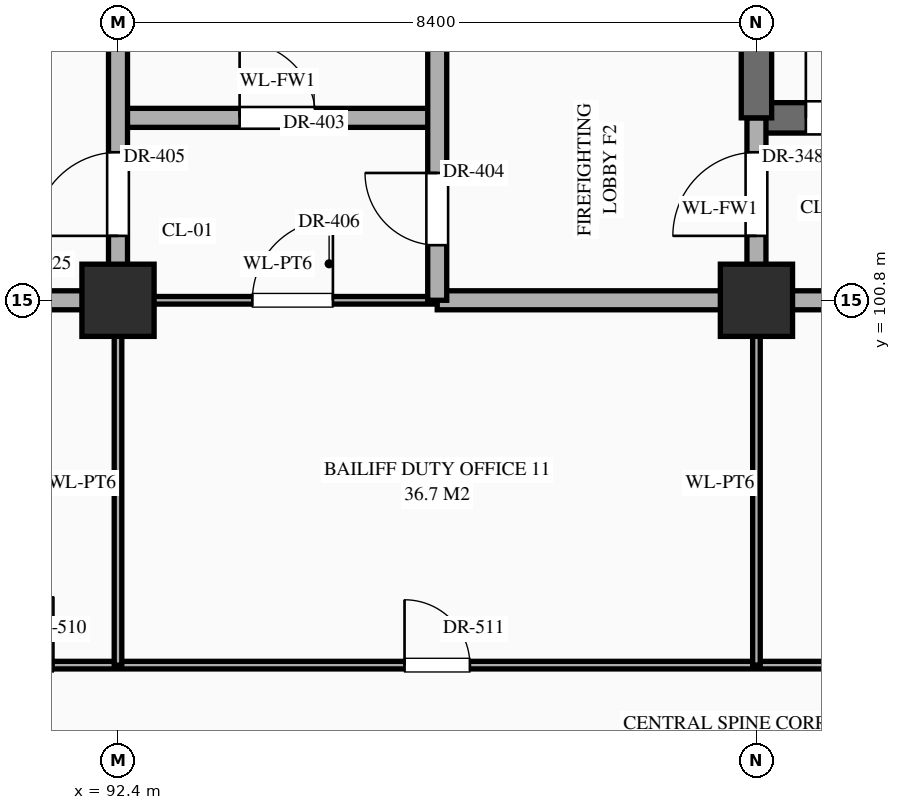
"""IFC4 building model, lengths in metres.
Left out: names, types, materials, properties, quantities, classifications, styles, units other than length and angle.
Written with IfcOpenShell. Run it as: python <this file> out.ifc"""

import sys

from ifc_helpers import new_model, si_unit, direction, frame, frame_2d, origin, origin_2d, place, context, subcontext, project, spatial, rectangle, extrude, element, fill, save


model = new_model("IFC4")
c1 = context("Model", 3, precision=1e-05, world=origin(), true_north=direction((0.0, 1.0)))
c2 = subcontext(c1, "Body", "Model", "MODEL_VIEW")
j1 = project(units=[si_unit("LENGTHUNIT", "METRE"), si_unit("PLANEANGLEUNIT", "RADIAN")], contexts=[c1])
p1 = place(None, origin())
s1 = spatial("IfcSite", under=j1, at=p1, CompositionType="ELEMENT")
p2 = place(p1, origin())
s2 = spatial("IfcBuilding", under=s1, at=p2, CompositionType="ELEMENT")
p3 = place(p2, frame((0.0, 0.0, -5.4)))
s3 = spatial("IfcBuildingStorey", under=s2, at=p3, CompositionType="ELEMENT", Elevation=-5.4)
for number, where, z_axis, x_axis in (
    (1, (92.4, 100.8, 0.0), (0.0, 0.0, 1.0), (1.0, 0.0, 0.0)),
    (2, (100.8, 100.8, 0.0), (0.0, 0.0, 1.0), (1.0, 0.0, 0.0)),
):
    element("IfcColumn", number, at=place(p3, frame(where, z_axis=z_axis, x_axis=x_axis)), inside=s3, PredefinedType="COLUMN", context=c2, shape_type="SweptSolid", body=[
        extrude(rectangle(XDim=0.95, YDim=0.95, at=origin_2d()), origin(), (0.0, 0.0, 1.0), 5.4),
    ])
p4 = place(p3, frame((16.8, 96.0, 0.0), z_axis=(0.0, 0.0, 1.0), x_axis=(1.0, 0.0, 0.0)))
e3 = element("IfcWall", 3, at=p4, inside=s3, PredefinedType="STANDARD", context=c2, shape_type="SweptSolid", body=[
    extrude(rectangle(XDim=134.4, YDim=0.1, at=frame_2d((67.2, 0.0))), origin(), (0.0, 0.0, 1.0), 5.1),
])
p5 = place(p4, frame((3.56, 0.0, 0.0)))
e4 = element("IfcOpeningElement", 4, at=p5, cuts=e3, PredefinedType="OPENING", context=c2, shape_type="SweptSolid", body=[
    extrude(rectangle(XDim=1.28, YDim=2.35, at=frame_2d((0.64, 1.175))), frame((0.0, 0.062, 0.0), z_axis=(0.0, -1.0, 0.0), x_axis=(1.0, 0.0, 0.0)), (0.0, 0.0, 1.0), 0.124),
])
p6 = place(p4, frame((9.63, 0.0, 0.0)))
e5 = element("IfcOpeningElement", 5, at=p6, cuts=e3, PredefinedType="OPENING", context=c2, shape_type="SweptSolid", body=[
    extrude(rectangle(XDim=0.94, YDim=2.3, at=frame_2d((0.47, 1.15))), frame((0.0, 0.062, 0.0), z_axis=(0.0, -1.0, 0.0), x_axis=(1.0, 0.0, 0.0)), (0.0, 0.0, 1.0), 0.124),
])
p7 = place(p4, frame((12.51, 0.0, 0.0)))
e6 = element("IfcOpeningElement", 6, at=p7, cuts=e3, PredefinedType="OPENING", context=c2, shape_type="SweptSolid", body=[
    extrude(rectangle(XDim=0.98, YDim=2.35, at=frame_2d((0.49, 1.175))), frame((0.0, 0.062, 0.0), z_axis=(0.0, -1.0, 0.0), x_axis=(1.0, 0.0, 0.0)), (0.0, 0.0, 1.0), 0.124),
])
p8 = place(p4, frame((14.99, 0.0, 0.0)))
e7 = element("IfcOpeningElement", 7, at=p8, cuts=e3, PredefinedType="OPENING", context=c2, shape_type="SweptSolid", body=[
    extrude(rectangle(XDim=1.02, YDim=2.4, at=frame_2d((0.51, 1.2))), frame((0.0, 0.062, 0.0), z_axis=(0.0, -1.0, 0.0), x_axis=(1.0, 0.0, 0.0)), (0.0, 0.0, 1.0), 0.124),
])
p9 = place(p4, frame((20.47, 0.0, 0.0)))
e8 = element("IfcOpeningElement", 8, at=p9, cuts=e3, PredefinedType="OPENING", context=c2, shape_type="SweptSolid", body=[
    extrude(rectangle(XDim=1.06, YDim=2.4, at=frame_2d((0.53, 1.2))), frame((0.0, 0.062, 0.0), z_axis=(0.0, -1.0, 0.0), x_axis=(1.0, 0.0, 0.0)), (0.0, 0.0, 1.0), 0.124),
])
p10 = place(p4, frame((28.83, 0.0, 0.0)))
e9 = element("IfcOpeningElement", 9, at=p10, cuts=e3, PredefinedType="OPENING", context=c2, shape_type="SweptSolid", body=[
    extrude(rectangle(XDim=1.14, YDim=2.4, at=frame_2d((0.57, 1.2))), frame((0.0, 0.062, 0.0), z_axis=(0.0, -1.0, 0.0), x_axis=(1.0, 0.0, 0.0)), (0.0, 0.0, 1.0), 0.124),
])
p11 = place(p4, frame((34.78, 0.0, 0.0)))
e10 = element("IfcOpeningElement", 10, at=p11, cuts=e3, PredefinedType="OPENING", context=c2, shape_type="SweptSolid", body=[
    extrude(rectangle(XDim=1.04, YDim=2.2, at=frame_2d((0.52, 1.1))), frame((0.0, 0.062, 0.0), z_axis=(0.0, -1.0, 0.0), x_axis=(1.0, 0.0, 0.0)), (0.0, 0.0, 1.0), 0.124),
])
p12 = place(p4, frame((37.66, 0.0, 0.0)))
e11 = element("IfcOpeningElement", 11, at=p12, cuts=e3, PredefinedType="OPENING", context=c2, shape_type="SweptSolid", body=[
    extrude(rectangle(XDim=1.08, YDim=2.25, at=frame_2d((0.54, 1.125))), frame((0.0, 0.062, 0.0), z_axis=(0.0, -1.0, 0.0), x_axis=(1.0, 0.0, 0.0)), (0.0, 0.0, 1.0), 0.124),
])
p13 = place(p4, frame((40.14, 0.0, 0.0)))
e12 = element("IfcOpeningElement", 12, at=p13, cuts=e3, PredefinedType="OPENING", context=c2, shape_type="SweptSolid", body=[
    extrude(rectangle(XDim=1.12, YDim=2.25, at=frame_2d((0.56, 1.125))), frame((0.0, 0.062, 0.0), z_axis=(0.0, -1.0, 0.0), x_axis=(1.0, 0.0, 0.0)), (0.0, 0.0, 1.0), 0.124),
])
p14 = place(p4, frame((45.62, 0.0, 0.0)))
e13 = element("IfcOpeningElement", 13, at=p14, cuts=e3, PredefinedType="OPENING", context=c2, shape_type="SweptSolid", body=[
    extrude(rectangle(XDim=1.16, YDim=2.3, at=frame_2d((0.58, 1.15))), frame((0.0, 0.062, 0.0), z_axis=(0.0, -1.0, 0.0), x_axis=(1.0, 0.0, 0.0)), (0.0, 0.0, 1.0), 0.124),
])
p15 = place(p4, frame((54.0, 0.0, 0.0)))
e14 = element("IfcOpeningElement", 14, at=p15, cuts=e3, PredefinedType="OPENING", context=c2, shape_type="SweptSolid", body=[
    extrude(rectangle(XDim=1.2, YDim=2.35, at=frame_2d((0.6, 1.175))), frame((0.0, 0.062, 0.0), z_axis=(0.0, -1.0, 0.0), x_axis=(1.0, 0.0, 0.0)), (0.0, 0.0, 1.0), 0.124),
])
p16 = place(p4, frame((62.38, 0.0, 0.0)))
e15 = element("IfcOpeningElement", 15, at=p16, cuts=e3, PredefinedType="OPENING", context=c2, shape_type="SweptSolid", body=[
    extrude(rectangle(XDim=1.24, YDim=2.3, at=frame_2d((0.62, 1.15))), frame((0.0, 0.062, 0.0), z_axis=(0.0, -1.0, 0.0), x_axis=(1.0, 0.0, 0.0)), (0.0, 0.0, 1.0), 0.124),
])
p17 = place(p4, frame((68.37, 0.0, 0.0)))
e16 = element("IfcOpeningElement", 16, at=p17, cuts=e3, PredefinedType="OPENING", context=c2, shape_type="SweptSolid", body=[
    extrude(rectangle(XDim=1.06, YDim=2.4, at=frame_2d((0.53, 1.2))), frame((0.0, 0.062, 0.0), z_axis=(0.0, -1.0, 0.0), x_axis=(1.0, 0.0, 0.0)), (0.0, 0.0, 1.0), 0.124),
])
p18 = place(p4, frame((71.23, 0.0, 0.0)))
e17 = element("IfcOpeningElement", 17, at=p18, cuts=e3, PredefinedType="OPENING", context=c2, shape_type="SweptSolid", body=[
    extrude(rectangle(XDim=1.14, YDim=2.4, at=frame_2d((0.57, 1.2))), frame((0.0, 0.062, 0.0), z_axis=(0.0, -1.0, 0.0), x_axis=(1.0, 0.0, 0.0)), (0.0, 0.0, 1.0), 0.124),
])
p19 = place(p4, frame((73.85, 0.0, 0.0)))
e18 = element("IfcOpeningElement", 18, at=p19, cuts=e3, PredefinedType="OPENING", context=c2, shape_type="SweptSolid", body=[
    extrude(rectangle(XDim=0.9, YDim=2.15, at=frame_2d((0.45, 1.075))), frame((0.0, 0.062, 0.0), z_axis=(0.0, -1.0, 0.0), x_axis=(1.0, 0.0, 0.0)), (0.0, 0.0, 1.0), 0.124),
])
p20 = place(p4, frame((79.37, 0.0, 0.0)))
e19 = element("IfcOpeningElement", 19, at=p20, cuts=e3, PredefinedType="OPENING", context=c2, shape_type="SweptSolid", body=[
    extrude(rectangle(XDim=0.86, YDim=2.1, at=frame_2d((0.43, 1.05))), frame((0.0, 0.062, 0.0), z_axis=(0.0, -1.0, 0.0), x_axis=(1.0, 0.0, 0.0)), (0.0, 0.0, 1.0), 0.124),
])
p21 = place(p4, frame((87.74, 0.0, 0.0)))
e20 = element("IfcOpeningElement", 20, at=p21, cuts=e3, PredefinedType="OPENING", context=c2, shape_type="SweptSolid", body=[
    extrude(rectangle(XDim=0.92, YDim=2.15, at=frame_2d((0.46, 1.075))), frame((0.0, 0.062, 0.0), z_axis=(0.0, -1.0, 0.0), x_axis=(1.0, 0.0, 0.0)), (0.0, 0.0, 1.0), 0.124),
])
p22 = place(p4, frame((93.62, 0.0, 0.0)))
e21 = element("IfcOpeningElement", 21, at=p22, cuts=e3, PredefinedType="OPENING", context=c2, shape_type="SweptSolid", body=[
    extrude(rectangle(XDim=0.96, YDim=2.2, at=frame_2d((0.48, 1.1))), frame((0.0, 0.062, 0.0), z_axis=(0.0, -1.0, 0.0), x_axis=(1.0, 0.0, 0.0)), (0.0, 0.0, 1.0), 0.124),
])
p23 = place(p4, frame((96.5, 0.0, 0.0)))
e22 = element("IfcOpeningElement", 22, at=p23, cuts=e3, PredefinedType="OPENING", context=c2, shape_type="SweptSolid", body=[
    extrude(rectangle(XDim=1.0, YDim=2.25, at=frame_2d((0.5, 1.125))), frame((0.0, 0.062, 0.0), z_axis=(0.0, -1.0, 0.0), x_axis=(1.0, 0.0, 0.0)), (0.0, 0.0, 1.0), 0.124),
])
p24 = place(p4, frame((98.98, 0.0, 0.0)))
e23 = element("IfcOpeningElement", 23, at=p24, cuts=e3, PredefinedType="OPENING", context=c2, shape_type="SweptSolid", body=[
    extrude(rectangle(XDim=1.04, YDim=2.2, at=frame_2d((0.52, 1.1))), frame((0.0, 0.062, 0.0), z_axis=(0.0, -1.0, 0.0), x_axis=(1.0, 0.0, 0.0)), (0.0, 0.0, 1.0), 0.124),
])
p25 = place(p4, frame((104.53, 0.0, 0.0)))
e24 = element("IfcOpeningElement", 24, at=p25, cuts=e3, PredefinedType="OPENING", context=c2, shape_type="SweptSolid", body=[
    extrude(rectangle(XDim=0.94, YDim=2.3, at=frame_2d((0.47, 1.15))), frame((0.0, 0.062, 0.0), z_axis=(0.0, -1.0, 0.0), x_axis=(1.0, 0.0, 0.0)), (0.0, 0.0, 1.0), 0.124),
])
p26 = place(p4, frame((112.91, 0.0, 0.0)))
e25 = element("IfcOpeningElement", 25, at=p26, cuts=e3, PredefinedType="OPENING", context=c2, shape_type="SweptSolid", body=[
    extrude(rectangle(XDim=0.98, YDim=2.35, at=frame_2d((0.49, 1.175))), frame((0.0, 0.062, 0.0), z_axis=(0.0, -1.0, 0.0), x_axis=(1.0, 0.0, 0.0)), (0.0, 0.0, 1.0), 0.124),
])
p27 = place(p4, frame((118.79, 0.0, 0.0)))
e26 = element("IfcOpeningElement", 26, at=p27, cuts=e3, PredefinedType="OPENING", context=c2, shape_type="SweptSolid", body=[
    extrude(rectangle(XDim=1.02, YDim=2.4, at=frame_2d((0.51, 1.2))), frame((0.0, 0.062, 0.0), z_axis=(0.0, -1.0, 0.0), x_axis=(1.0, 0.0, 0.0)), (0.0, 0.0, 1.0), 0.124),
])
p28 = place(p4, frame((121.67, 0.0, 0.0)))
e27 = element("IfcOpeningElement", 27, at=p28, cuts=e3, PredefinedType="OPENING", context=c2, shape_type="SweptSolid", body=[
    extrude(rectangle(XDim=1.06, YDim=2.4, at=frame_2d((0.53, 1.2))), frame((0.0, 0.062, 0.0), z_axis=(0.0, -1.0, 0.0), x_axis=(1.0, 0.0, 0.0)), (0.0, 0.0, 1.0), 0.124),
])
p29 = place(p4, frame((124.13, 0.0, 0.0)))
e28 = element("IfcOpeningElement", 28, at=p29, cuts=e3, PredefinedType="OPENING", context=c2, shape_type="SweptSolid", body=[
    extrude(rectangle(XDim=1.14, YDim=2.4, at=frame_2d((0.57, 1.2))), frame((0.0, 0.062, 0.0), z_axis=(0.0, -1.0, 0.0), x_axis=(1.0, 0.0, 0.0)), (0.0, 0.0, 1.0), 0.124),
])
p30 = place(p4, frame((129.75, 0.0, 0.0)))
e29 = element("IfcOpeningElement", 29, at=p30, cuts=e3, PredefinedType="OPENING", context=c2, shape_type="SweptSolid", body=[
    extrude(rectangle(XDim=0.9, YDim=2.15, at=frame_2d((0.45, 1.075))), frame((0.0, 0.062, 0.0), z_axis=(0.0, -1.0, 0.0), x_axis=(1.0, 0.0, 0.0)), (0.0, 0.0, 1.0), 0.124),
])
p31 = place(p3, frame((75.6, 100.8, 0.0), z_axis=(0.0, 0.0, 1.0), x_axis=(1.0, 0.0, 0.0)))
e30 = element("IfcWall", 30, at=p31, inside=s3, PredefinedType="STANDARD", context=c2, shape_type="SweptSolid", body=[
    extrude(rectangle(XDim=16.8, YDim=0.25, at=frame_2d((8.4, 0.0))), origin(), (0.0, 0.0, 1.0), 4.25),
])
p32 = place(p31, frame((3.7, 0.0, 0.0)))
e31 = element("IfcOpeningElement", 31, at=p32, cuts=e30, PredefinedType="OPENING", context=c2, shape_type="SweptSolid", body=[
    extrude(rectangle(XDim=1.0, YDim=2.2, at=frame_2d((0.5, 1.1))), frame((0.0, 0.137, 0.0), z_axis=(0.0, -1.0, 0.0), x_axis=(1.0, 0.0, 0.0)), (0.0, 0.0, 1.0), 0.274),
])
p33 = place(p31, frame((9.748, 0.0, 0.0)))
e32 = element("IfcOpeningElement", 32, at=p33, cuts=e30, PredefinedType="OPENING", context=c2, shape_type="SweptSolid", body=[
    extrude(rectangle(XDim=1.1, YDim=2.2, at=frame_2d((0.55, 1.1))), frame((0.0, 0.137, 0.0), z_axis=(0.0, -1.0, 0.0), x_axis=(1.0, 0.0, 0.0)), (0.0, 0.0, 1.0), 0.274),
])
p34 = place(p31, frame((12.5, 0.0, 0.0)))
e33 = element("IfcOpeningElement", 33, at=p34, cuts=e30, PredefinedType="OPENING", context=c2, shape_type="SweptSolid", body=[
    extrude(rectangle(XDim=1.0, YDim=2.2, at=frame_2d((0.5, 1.1))), frame((0.0, 0.137, 0.0), z_axis=(0.0, -1.0, 0.0), x_axis=(1.0, 0.0, 0.0)), (0.0, 0.0, 1.0), 0.274),
])
p35 = place(p31, frame((14.827, 0.0, 0.0)))
e34 = element("IfcOpeningElement", 34, at=p35, cuts=e30, PredefinedType="OPENING", context=c2, shape_type="SweptSolid", body=[
    extrude(rectangle(XDim=0.95, YDim=2.15, at=frame_2d((0.475, 1.075))), frame((0.0, 0.137, 0.0), z_axis=(0.0, -1.0, 0.0), x_axis=(1.0, 0.0, 0.0)), (0.0, 0.0, 1.0), 0.274),
])
p36 = place(p3, frame((92.4, 100.8, 0.0), z_axis=(0.0, 0.0, 1.0), x_axis=(1.0, 0.0, 0.0)))
e35 = element("IfcWall", 35, at=p36, inside=s3, PredefinedType="STANDARD", context=c2, shape_type="SweptSolid", body=[
    extrude(rectangle(XDim=4.2, YDim=0.1, at=frame_2d((2.1, 0.0))), origin(), (0.0, 0.0, 1.0), 4.25),
])
p37 = place(p36, frame((1.768, 0.0, 0.0)))
e36 = element("IfcOpeningElement", 36, at=p37, cuts=e35, PredefinedType="OPENING", context=c2, shape_type="SweptSolid", body=[
    extrude(rectangle(XDim=1.06, YDim=2.4, at=frame_2d((0.53, 1.2))), frame((0.0, 0.062, 0.0), z_axis=(0.0, -1.0, 0.0), x_axis=(1.0, 0.0, 0.0)), (0.0, 0.0, 1.0), 0.124),
])
p38 = place(p3, frame((96.6, 100.8, 0.0), z_axis=(0.0, 0.0, 1.0), x_axis=(1.0, 0.0, 0.0)))
e37 = element("IfcWall", 37, at=p38, inside=s3, PredefinedType="STANDARD", context=c2, shape_type="SweptSolid", body=[
    extrude(rectangle(XDim=12.6, YDim=0.25, at=frame_2d((6.3, 0.0))), origin(), (0.0, 0.0, 1.0), 4.25),
])
p39 = place(p38, frame((7.925, 0.0, 0.0)))
e38 = element("IfcOpeningElement", 38, at=p39, cuts=e37, PredefinedType="OPENING", context=c2, shape_type="SweptSolid", body=[
    extrude(rectangle(XDim=0.95, YDim=2.15, at=frame_2d((0.475, 1.075))), frame((0.0, 0.137, 0.0), z_axis=(0.0, -1.0, 0.0), x_axis=(1.0, 0.0, 0.0)), (0.0, 0.0, 1.0), 0.274),
])
p40 = place(p3, frame((92.4, 103.2, 0.0), z_axis=(0.0, 0.0, 1.0), x_axis=(1.0, 0.0, 0.0)))
e39 = element("IfcWall", 39, at=p40, inside=s3, PredefinedType="STANDARD", context=c2, shape_type="SweptSolid", body=[
    extrude(rectangle(XDim=4.2, YDim=0.25, at=frame_2d((2.1, 0.0))), origin(), (0.0, 0.0, 1.0), 5.1),
])
p41 = place(p40, frame((1.6, 0.0, 0.0)))
e40 = element("IfcOpeningElement", 40, at=p41, cuts=e39, PredefinedType="OPENING", context=c2, shape_type="SweptSolid", body=[
    extrude(rectangle(XDim=1.0, YDim=2.2, at=frame_2d((0.5, 1.1))), frame((0.0, 0.137, 0.0), z_axis=(0.0, -1.0, 0.0), x_axis=(1.0, 0.0, 0.0)), (0.0, 0.0, 1.0), 0.274),
])
p42 = place(p3, frame((100.8, 103.2, 0.0), z_axis=(0.0, 0.0, 1.0), x_axis=(1.0, 0.0, 0.0)))
e41 = element("IfcWall", 41, at=p42, inside=s3, PredefinedType="SHEAR", context=c2, shape_type="SweptSolid", body=[
    extrude(rectangle(XDim=8.4, YDim=0.4, at=frame_2d((4.2, 0.0))), origin(), (0.0, 0.0, 1.0), 5.1),
])
p43 = place(p42, frame((0.65, 0.0, 0.0)))
e42 = element("IfcOpeningElement", 42, at=p43, cuts=e41, PredefinedType="OPENING", context=c2, shape_type="SweptSolid", body=[
    extrude(rectangle(XDim=1.1, YDim=2.2, at=frame_2d((0.55, 1.1))), frame((0.0, 0.212, 0.0), z_axis=(0.0, -1.0, 0.0), x_axis=(1.0, 0.0, 0.0)), (0.0, 0.0, 1.0), 0.424),
])
p44 = place(p3, frame((92.4, 96.0, 0.0), z_axis=(0.0, 0.0, 1.0), x_axis=(0.0, 1.0, 0.0)))
e43 = element("IfcWall", 43, at=p44, inside=s3, PredefinedType="STANDARD", context=c2, shape_type="SweptSolid", body=[
    extrude(rectangle(XDim=4.8, YDim=0.1, at=frame_2d((2.4, 0.0))), origin(), (0.0, 0.0, 1.0), 4.35),
])
p45 = place(p3, frame((92.4, 100.8, 0.0), z_axis=(0.0, 0.0, 1.0), x_axis=(0.0, 1.0, 0.0)))
e44 = element("IfcWall", 44, at=p45, inside=s3, PredefinedType="STANDARD", context=c2, shape_type="SweptSolid", body=[
    extrude(rectangle(XDim=3.6, YDim=0.25, at=frame_2d((1.8, 0.0))), origin(), (0.0, 0.0, 1.0), 4.35),
])
p46 = place(p45, frame((0.847, 0.0, 0.0)))
e45 = element("IfcOpeningElement", 45, at=p46, cuts=e44, PredefinedType="OPENING", context=c2, shape_type="SweptSolid", body=[
    extrude(rectangle(XDim=1.1, YDim=2.2, at=frame_2d((0.55, 1.1))), frame((0.0, 0.137, 0.0), z_axis=(0.0, -1.0, 0.0), x_axis=(1.0, 0.0, 0.0)), (0.0, 0.0, 1.0), 0.274),
])
p47 = place(p3, frame((96.6, 100.8, 0.0), z_axis=(0.0, 0.0, 1.0), x_axis=(0.0, 1.0, 0.0)))
e46 = element("IfcWall", 46, at=p47, inside=s3, PredefinedType="STANDARD", context=c2, shape_type="SweptSolid", body=[
    extrude(rectangle(XDim=3.6, YDim=0.25, at=frame_2d((1.8, 0.0))), origin(), (0.0, 0.0, 1.0), 4.65),
])
p48 = place(p47, frame((0.725, 0.0, 0.0)))
e47 = element("IfcOpeningElement", 47, at=p48, cuts=e46, PredefinedType="OPENING", context=c2, shape_type="SweptSolid", body=[
    extrude(rectangle(XDim=0.95, YDim=2.15, at=frame_2d((0.475, 1.075))), frame((0.0, 0.137, 0.0), z_axis=(0.0, -1.0, 0.0), x_axis=(1.0, 0.0, 0.0)), (0.0, 0.0, 1.0), 0.274),
])
p49 = place(p3, frame((100.8, 96.0, 0.0), z_axis=(0.0, 0.0, 1.0), x_axis=(0.0, 1.0, 0.0)))
e48 = element("IfcWall", 48, at=p49, inside=s3, PredefinedType="STANDARD", context=c2, shape_type="SweptSolid", body=[
    extrude(rectangle(XDim=4.8, YDim=0.1, at=frame_2d((2.4, 0.0))), origin(), (0.0, 0.0, 1.0), 4.35),
])
p50 = place(p3, frame((100.8, 100.8, 0.0), z_axis=(0.0, 0.0, 1.0), x_axis=(0.0, 1.0, 0.0)))
e49 = element("IfcWall", 49, at=p50, inside=s3, PredefinedType="STANDARD", context=c2, shape_type="SweptSolid", body=[
    extrude(rectangle(XDim=2.4, YDim=0.25, at=frame_2d((1.2, 0.0))), origin(), (0.0, 0.0, 1.0), 4.35),
])
p51 = place(p50, frame((0.847, 0.0, 0.0)))
e50 = element("IfcOpeningElement", 50, at=p51, cuts=e49, PredefinedType="OPENING", context=c2, shape_type="SweptSolid", body=[
    extrude(rectangle(XDim=1.1, YDim=2.2, at=frame_2d((0.55, 1.1))), frame((0.0, 0.137, 0.0), z_axis=(0.0, -1.0, 0.0), x_axis=(1.0, 0.0, 0.0)), (0.0, 0.0, 1.0), 0.274),
])
p52 = place(p3, frame((100.8, 103.2, 0.0), z_axis=(0.0, 0.0, 1.0), x_axis=(0.0, 1.0, 0.0)))
e51 = element("IfcWall", 51, at=p52, inside=s3, PredefinedType="SHEAR", context=c2, shape_type="SweptSolid", body=[
    extrude(rectangle(XDim=1.2, YDim=0.4, at=frame_2d((0.6, 0.0))), origin(), (0.0, 0.0, 1.0), 5.1),
])
p53 = place(p43, origin())
e52 = element("IfcDoor", 52, at=p53, inside=s3, OperationType="SINGLE_SWING_LEFT", PredefinedType="DOOR", context=c2, shape_type="SweptSolid", body=[
    extrude(rectangle(XDim=1.1, YDim=2.2, at=frame_2d((0.55, 1.1))), frame((0.0, 0.025, 0.0), z_axis=(0.0, -1.0, 0.0), x_axis=(1.0, 0.0, 0.0)), (0.0, 0.0, 1.0), 0.05),
])
fill(e42, e52)
p54 = place(p51, origin())
e53 = element("IfcDoor", 53, at=p54, inside=s3, OperationType="SINGLE_SWING_LEFT", PredefinedType="DOOR", context=c2, shape_type="SweptSolid", body=[
    extrude(rectangle(XDim=1.1, YDim=2.2, at=frame_2d((0.55, 1.1))), frame((0.0, 0.025, 0.0), z_axis=(0.0, -1.0, 0.0), x_axis=(1.0, 0.0, 0.0)), (0.0, 0.0, 1.0), 0.05),
])
fill(e50, e53)
p55 = place(p41, origin())
e54 = element("IfcDoor", 54, at=p55, inside=s3, OperationType="SINGLE_SWING_LEFT", PredefinedType="DOOR", context=c2, shape_type="SweptSolid", body=[
    extrude(rectangle(XDim=1.0, YDim=2.2, at=frame_2d((0.5, 1.1))), frame((0.0, 0.025, 0.0), z_axis=(0.0, -1.0, 0.0), x_axis=(1.0, 0.0, 0.0)), (0.0, 0.0, 1.0), 0.05),
])
fill(e40, e54)
p56 = place(p48, origin())
e55 = element("IfcDoor", 55, at=p56, inside=s3, OperationType="SINGLE_SWING_RIGHT", PredefinedType="DOOR", context=c2, shape_type="SweptSolid", body=[
    extrude(rectangle(XDim=0.95, YDim=2.15, at=frame_2d((0.475, 1.075))), frame((0.0, 0.025, 0.0), z_axis=(0.0, -1.0, 0.0), x_axis=(1.0, 0.0, 0.0)), (0.0, 0.0, 1.0), 0.05),
])
fill(e47, e55)
p57 = place(p46, origin())
e56 = element("IfcDoor", 56, at=p57, inside=s3, OperationType="SINGLE_SWING_LEFT", PredefinedType="DOOR", context=c2, shape_type="SweptSolid", body=[
    extrude(rectangle(XDim=1.1, YDim=2.2, at=frame_2d((0.55, 1.1))), frame((0.0, 0.025, 0.0), z_axis=(0.0, -1.0, 0.0), x_axis=(1.0, 0.0, 0.0)), (0.0, 0.0, 1.0), 0.05),
])
fill(e45, e56)
p58 = place(p37, origin())
e57 = element("IfcDoor", 57, at=p58, inside=s3, OperationType="SINGLE_SWING_RIGHT", PredefinedType="DOOR", context=c2, shape_type="SweptSolid", body=[
    extrude(rectangle(XDim=1.06, YDim=2.4, at=frame_2d((0.53, 1.2))), frame((0.0, 0.025, 0.0), z_axis=(0.0, -1.0, 0.0), x_axis=(1.0, 0.0, 0.0)), (0.0, 0.0, 1.0), 0.05),
])
fill(e36, e57)
p59 = place(p19, origin())
e58 = element("IfcDoor", 58, at=p59, inside=s3, OperationType="SINGLE_SWING_RIGHT", PredefinedType="DOOR", context=c2, shape_type="SweptSolid", body=[
    extrude(rectangle(XDim=0.9, YDim=2.15, at=frame_2d((0.45, 1.075))), frame((0.0, 0.025, 0.0), z_axis=(0.0, -1.0, 0.0), x_axis=(1.0, 0.0, 0.0)), (0.0, 0.0, 1.0), 0.05),
])
fill(e18, e58)
p60 = place(p20, origin())
e59 = element("IfcDoor", 59, at=p60, inside=s3, OperationType="SINGLE_SWING_LEFT", PredefinedType="DOOR", context=c2, shape_type="SweptSolid", body=[
    extrude(rectangle(XDim=0.86, YDim=2.1, at=frame_2d((0.43, 1.05))), frame((0.0, 0.025, 0.0), z_axis=(0.0, -1.0, 0.0), x_axis=(1.0, 0.0, 0.0)), (0.0, 0.0, 1.0), 0.05),
])
fill(e19, e59)
save(model, sys.argv[1])
